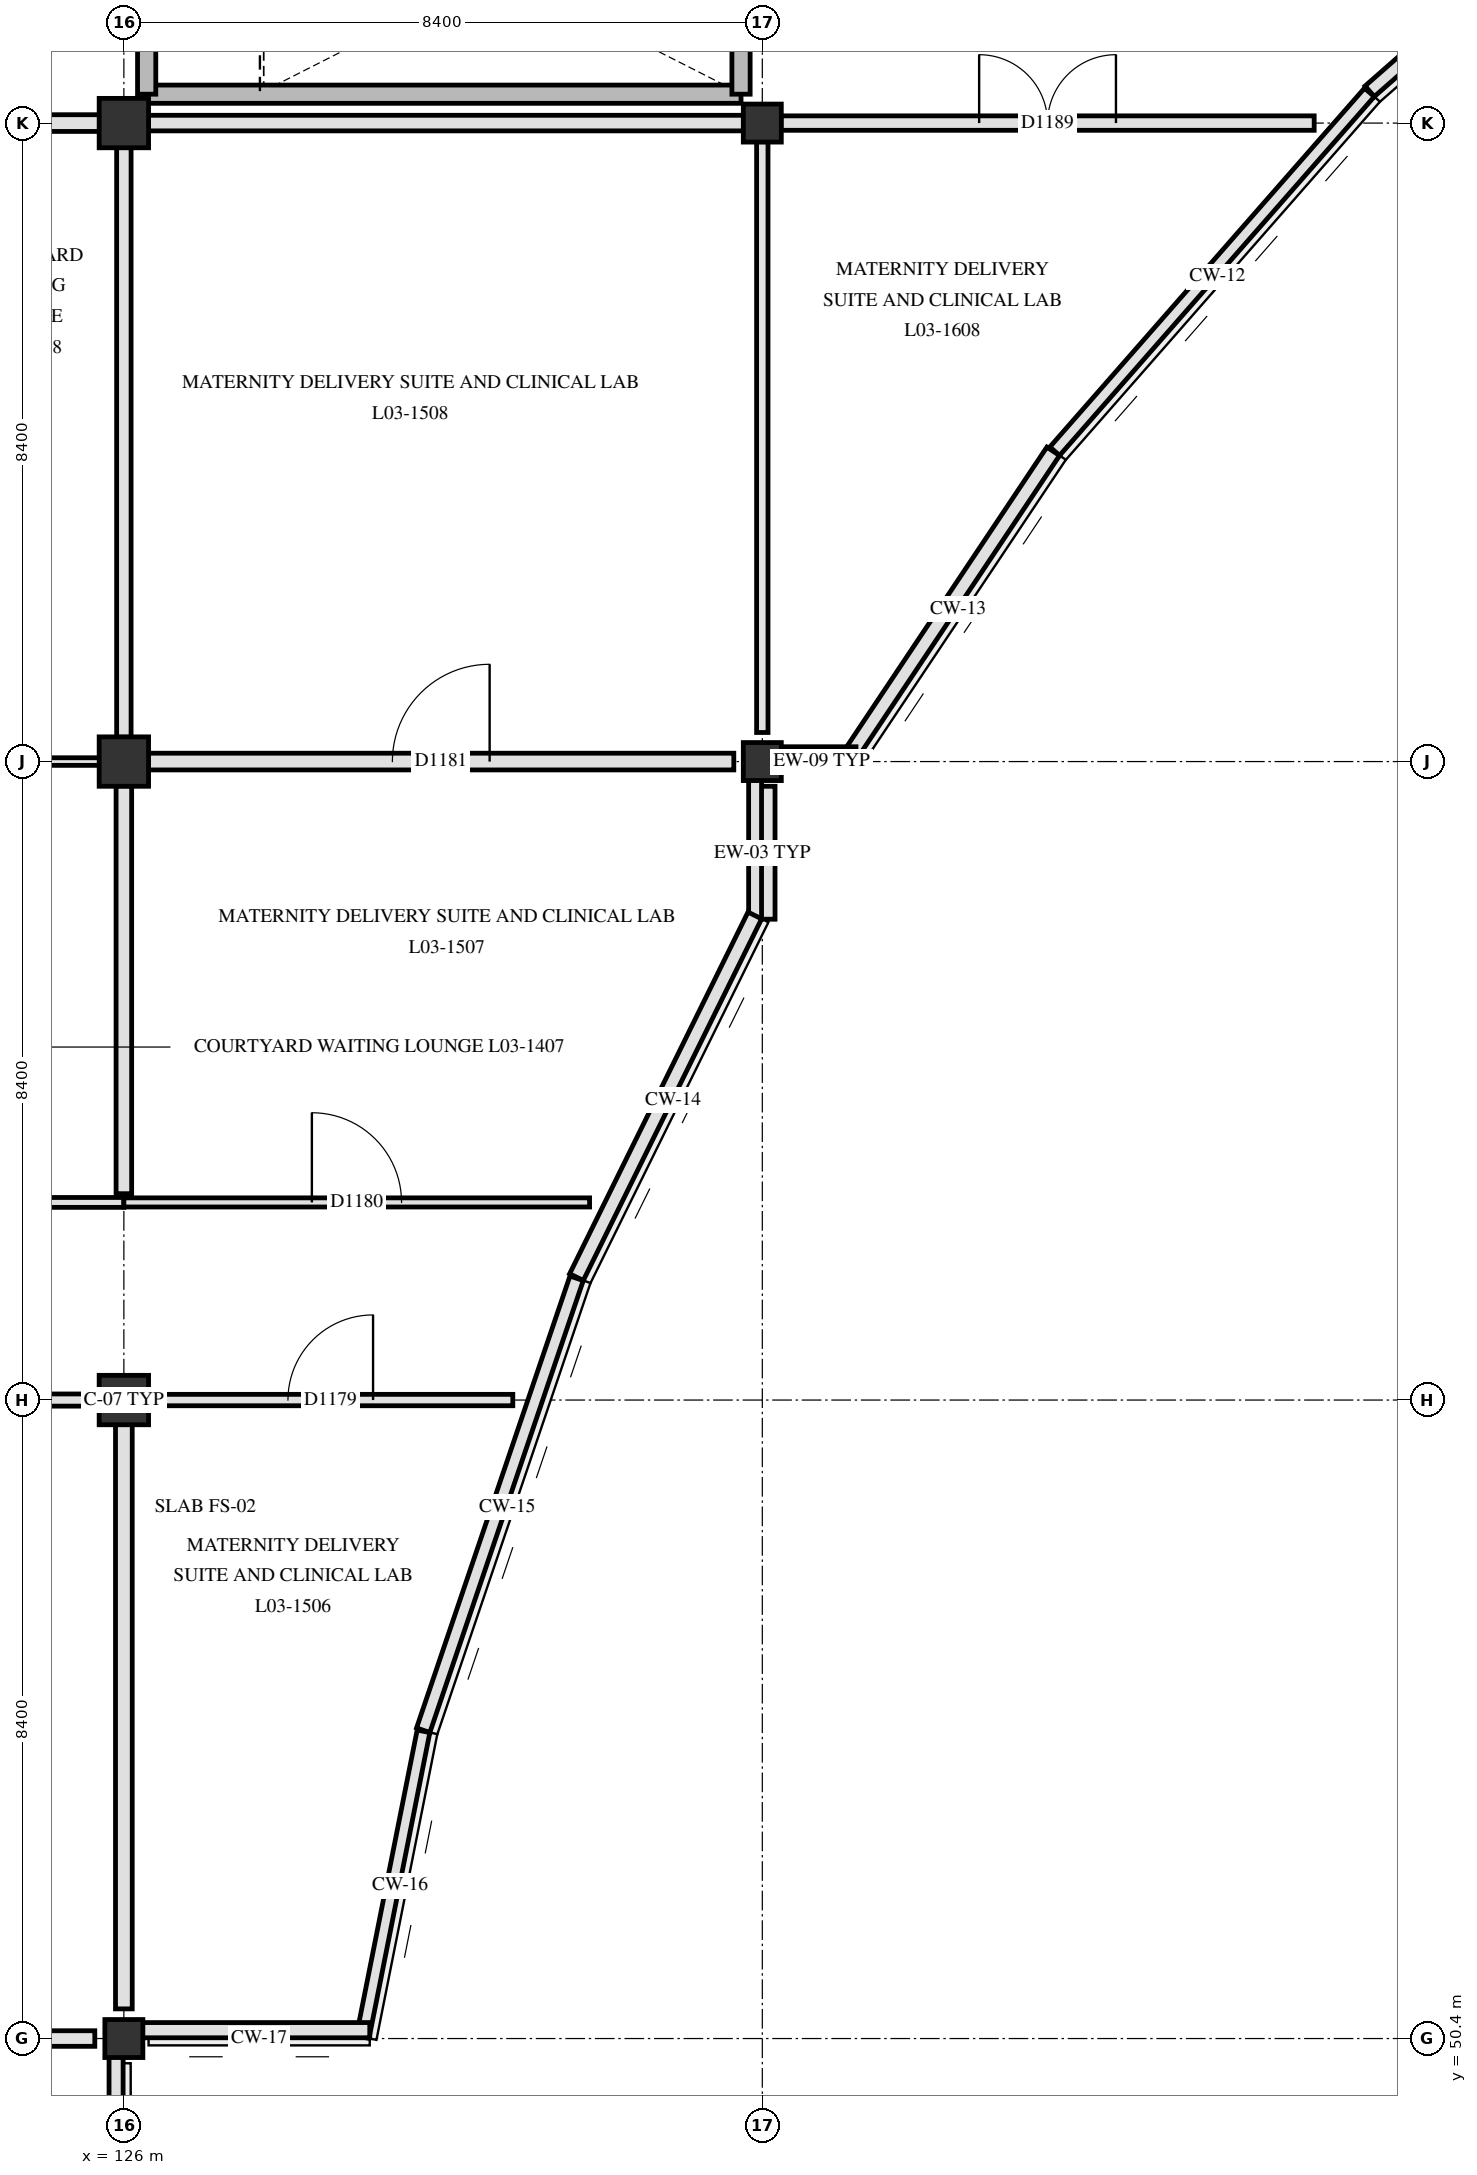
"""IFC4 building model, lengths in metres.
Left out: names, types, materials, properties, quantities, classifications, styles, units other than length and angle.
Written with IfcOpenShell. Run it as: python <this file> out.ifc"""

import sys

from ifc_helpers import new_model, si_unit, direction, frame, frame_2d, origin, origin_2d, place, context, subcontext, project, spatial, rectangle, circle, extrude, element, fill, save


model = new_model("IFC4")
c1 = context("Model", 3, precision=1e-05, world=origin(), true_north=direction((0.0, 1.0)))
c2 = subcontext(c1, "Body", "Model", "MODEL_VIEW")
j1 = project(units=[si_unit("LENGTHUNIT", "METRE"), si_unit("PLANEANGLEUNIT", "RADIAN")], contexts=[c1])
p1 = place(None, origin())
s1 = spatial("IfcSite", under=j1, at=p1, CompositionType="ELEMENT")
p2 = place(p1, origin())
s2 = spatial("IfcBuilding", under=s1, at=p2, CompositionType="ELEMENT")
p3 = place(p2, frame((0.0, 0.0, 14.4)))
s3 = spatial("IfcBuildingStorey", under=s2, at=p3, CompositionType="ELEMENT", Elevation=14.4)
p4 = place(p3, frame((126.0, 50.4, 0.0), z_axis=(0.0, 0.0, 1.0), x_axis=(1.0, 0.0, 0.0)))
e1 = element("IfcColumn", 1, at=p4, inside=s3, PredefinedType="COLUMN", context=c2, shape_type="SweptSolid", body=[
    extrude(rectangle(XDim=0.5, YDim=0.5, at=origin_2d()), origin(), (0.0, 0.0, 1.0), 4.2),
])
for number, where, z_axis, x_axis in (
    (2, (126.0, 58.8, 0.0), (0.0, 0.0, 1.0), (1.0, 0.0, 0.0)),
    (3, (126.0, 67.2, 0.0), (0.0, 0.0, 1.0), (1.0, 0.0, 0.0)),
    (4, (126.0, 75.6, 0.0), (0.0, 0.0, 1.0), (1.0, 0.0, 0.0)),
):
    element("IfcColumn", number, at=place(p3, frame(where, z_axis=z_axis, x_axis=x_axis)), inside=s3, PredefinedType="COLUMN", context=c2, shape_type="SweptSolid", body=[
        extrude(circle(Radius=0.325, at=origin_2d()), origin(), (0.0, 0.0, 1.0), 4.2),
    ])
for number, where, z_axis, x_axis in (
    (5, (134.4, 67.2, 0.0), (0.0, 0.0, 1.0), (1.0, 0.0, 0.0)),
    (6, (134.4, 75.6, 0.0), (0.0, 0.0, 1.0), (1.0, 0.0, 0.0)),
):
    element("IfcColumn", number, at=place(p3, frame(where, z_axis=z_axis, x_axis=x_axis)), inside=s3, PredefinedType="COLUMN", context=c2, shape_type="SweptSolid", body=[
        extrude(rectangle(XDim=0.5, YDim=0.5, at=origin_2d()), origin(), (0.0, 0.0, 1.0), 4.2),
    ])
p5 = place(p3, frame((135.633, 67.2, 0.0), z_axis=(0.0, 0.0, 1.0), x_axis=(-1.0, 0.0, 0.0)))
e7 = element("IfcWall", 7, at=p5, inside=s3, PredefinedType="SOLIDWALL", context=c2, shape_type="SweptSolid", body=[
    extrude(rectangle(XDim=0.908, YDim=0.235, at=frame_2d((0.454, 0.0))), origin(), (0.0, 0.0, 1.0), 3.89),
])
p6 = place(p3, frame((134.4, 66.875, 0.0), z_axis=(0.0, 0.0, 1.0), x_axis=(0.0, -1.0, 0.0)))
e8 = element("IfcWall", 8, at=p6, inside=s3, PredefinedType="SOLIDWALL", context=c2, shape_type="SweptSolid", body=[
    extrude(rectangle(XDim=1.749, YDim=0.335, at=frame_2d((0.875, 0.0))), origin(), (0.0, 0.0, 1.0), 3.89),
])
p7 = place(p3, frame((147.112, 80.158, 4.18), z_axis=(0.0, 0.0, 1.0), x_axis=(-0.751827083616, -0.659360323603, 0.0)))
e9 = element("IfcWall", 9, at=p7, inside=s3, PredefinedType="PARAPET", context=c2, shape_type="SweptSolid", body=[
    extrude(rectangle(XDim=6.279, YDim=0.185, at=frame_2d((3.139, 0.0))), origin(), (0.0, 0.0, 1.0), 1.17),
])
p8 = place(p3, frame((142.387, 76.004, 4.18), z_axis=(0.0, 0.0, 1.0), x_axis=(-0.659360323603, -0.751827083616, 0.0)))
e10 = element("IfcWall", 10, at=p8, inside=s3, PredefinedType="PARAPET", context=c2, shape_type="SweptSolid", body=[
    extrude(rectangle(XDim=6.279, YDim=0.17, at=frame_2d((3.139, 0.0))), origin(), (0.0, 0.0, 1.0), 1.17),
])
p9 = place(p3, frame((138.228, 71.281, 4.18), z_axis=(0.0, 0.0, 1.0), x_axis=(-0.555585388542, -0.831459485506, 0.0)))
e11 = element("IfcWall", 11, at=p9, inside=s3, PredefinedType="PARAPET", context=c2, shape_type="SweptSolid", body=[
    extrude(rectangle(XDim=4.835, YDim=0.2, at=frame_2d((2.418, 0.0))), origin(), (0.0, 0.0, 1.0), 1.17),
])
p10 = place(p3, frame((135.633, 67.302, 4.18), z_axis=(0.0, 0.0, 1.0), x_axis=(-1.0, 0.0, 0.0)))
e12 = element("IfcWall", 12, at=p10, inside=s3, PredefinedType="PARAPET", context=c2, shape_type="SweptSolid", body=[
    extrude(rectangle(XDim=1.233, YDim=0.185, at=frame_2d((0.616, 0.0))), origin(), (0.0, 0.0, 1.0), 1.17),
])
p11 = place(p3, frame((134.305, 67.2, 4.18), z_axis=(0.0, 0.0, 1.0), x_axis=(0.0, -1.0, 0.0)))
e13 = element("IfcWall", 13, at=p11, inside=s3, PredefinedType="PARAPET", context=c2, shape_type="SweptSolid", body=[
    extrude(rectangle(XDim=2.073, YDim=0.17, at=frame_2d((1.037, 0.0))), origin(), (0.0, 0.0, 1.0), 1.17),
])
p12 = place(p3, frame((134.301, 65.175, 4.18), z_axis=(0.0, 0.0, 1.0), x_axis=(-0.442291469854, -0.896871370763, 0.0)))
e14 = element("IfcWall", 14, at=p12, inside=s3, PredefinedType="PARAPET", context=c2, shape_type="SweptSolid", body=[
    extrude(rectangle(XDim=5.305, YDim=0.2, at=frame_2d((2.652, 0.0))), origin(), (0.0, 0.0, 1.0), 1.17),
])
p13 = place(p3, frame((131.957, 60.402, 4.18), z_axis=(0.0, 0.0, 1.0), x_axis=(-0.321460730255, -0.94692291075, 0.0)))
e15 = element("IfcWall", 15, at=p13, inside=s3, PredefinedType="PARAPET", context=c2, shape_type="SweptSolid", body=[
    extrude(rectangle(XDim=6.279, YDim=0.185, at=frame_2d((3.139, 0.0))), origin(), (0.0, 0.0, 1.0), 1.17),
])
p14 = place(p3, frame((129.942, 54.442, 4.18), z_axis=(0.0, 0.0, 1.0), x_axis=(-0.195085981744, -0.980786143727, 0.0)))
e16 = element("IfcWall", 16, at=p14, inside=s3, PredefinedType="PARAPET", context=c2, shape_type="SweptSolid", body=[
    extrude(rectangle(XDim=4.102, YDim=0.17, at=frame_2d((2.051, 0.0))), origin(), (0.0, 0.0, 1.0), 1.17),
])
p15 = place(p3, frame((129.235, 50.51, 4.18), z_axis=(0.0, 0.0, 1.0), x_axis=(-1.0, 0.0, 0.0)))
e17 = element("IfcWall", 17, at=p15, inside=s3, PredefinedType="PARAPET", context=c2, shape_type="SweptSolid", body=[
    extrude(rectangle(XDim=3.235, YDim=0.2, at=frame_2d((1.618, 0.0))), origin(), (0.0, 0.0, 1.0), 1.17),
])
p16 = place(p3, frame((125.897, 50.4, 4.18), z_axis=(0.0, 0.0, 1.0), x_axis=(0.0, -1.0, 0.0)))
e18 = element("IfcWall", 18, at=p16, inside=s3, PredefinedType="PARAPET", context=c2, shape_type="SweptSolid", body=[
    extrude(rectangle(XDim=8.4, YDim=0.185, at=frame_2d((4.2, 0.0))), origin(), (0.0, 0.0, 1.0), 1.17),
])
p17 = place(p3, frame((126.3, 75.98, 0.0), z_axis=(0.0, 0.0, 1.0), x_axis=(1.0, 0.0, 0.0)))
e19 = element("IfcWall", 19, at=p17, inside=s3, PredefinedType="SHEAR", context=c2, shape_type="SweptSolid", body=[
    extrude(rectangle(XDim=7.82, YDim=0.24, at=frame_2d((3.91, 0.0))), origin(), (0.0, 0.0, 1.0), 3.9),
])
for number, where, z_axis, x_axis in (
    (20, (126.3, 75.98, 0.0), (0.0, 0.0, 1.0), (0.0, 1.0, 0.0)),
    (21, (134.12, 75.98, 0.0), (0.0, 0.0, 1.0), (0.0, 1.0, 0.0)),
):
    element("IfcWall", number, at=place(p3, frame(where, z_axis=z_axis, x_axis=x_axis)), inside=s3, PredefinedType="SHEAR", context=c2, shape_type="SweptSolid", body=[
        extrude(rectangle(XDim=3.32, YDim=0.24, at=frame_2d((1.66, 0.0))), origin(), (0.0, 0.0, 1.0), 3.9),
    ])
p18 = place(p3, frame((117.945, 50.4, 0.0), z_axis=(0.0, 0.0, 1.0), x_axis=(1.0, 0.0, 0.0)))
e22 = element("IfcWall", 22, at=p18, inside=s3, PredefinedType="PARTITIONING", context=c2, shape_type="SweptSolid", body=[
    extrude(rectangle(XDim=7.672, YDim=0.205, at=frame_2d((3.836, 0.0))), origin(), (0.0, 0.0, 1.0), 3.29),
])
p19 = place(p3, frame((117.92, 58.8, 0.0), z_axis=(0.0, 0.0, 1.0), x_axis=(1.0, 0.0, 0.0)))
e23 = element("IfcWall", 23, at=p19, inside=s3, PredefinedType="PARTITIONING", context=c2, shape_type="SweptSolid", body=[
    extrude(rectangle(XDim=7.76, YDim=0.16, at=frame_2d((3.88, 0.0))), origin(), (0.0, 0.0, 1.0), 3.29),
])
p20 = place(p19, frame((3.23, 0.0, 0.0)))
e24 = element("IfcOpeningElement", 24, at=p20, cuts=e23, PredefinedType="OPENING", context=c2, shape_type="SweptSolid", body=[
    extrude(rectangle(XDim=1.3, YDim=2.2, at=frame_2d((0.65, 1.1))), frame((0.0, 0.09, 0.0), z_axis=(0.0, -1.0, 0.0), x_axis=(1.0, 0.0, 0.0)), (0.0, 0.0, 1.0), 0.18),
])
p21 = place(p3, frame((126.32, 58.8, 0.0), z_axis=(0.0, 0.0, 1.0), x_axis=(1.0, 0.0, 0.0)))
e25 = element("IfcWall", 25, at=p21, inside=s3, PredefinedType="PARTITIONING", context=c2, shape_type="SweptSolid", body=[
    extrude(rectangle(XDim=4.797, YDim=0.15, at=frame_2d((2.398, 0.0))), origin(), (0.0, 0.0, 1.0), 3.89),
])
p22 = place(p21, frame((1.839, 0.0, 0.0)))
e26 = element("IfcOpeningElement", 26, at=p22, cuts=e25, PredefinedType="OPENING", context=c2, shape_type="SweptSolid", body=[
    extrude(rectangle(XDim=1.12, YDim=2.18, at=frame_2d((0.56, 1.09))), frame((0.0, 0.085, 0.0), z_axis=(0.0, -1.0, 0.0), x_axis=(1.0, 0.0, 0.0)), (0.0, 0.0, 1.0), 0.17),
])
p23 = place(p3, frame((122.087, 61.4, 0.0), z_axis=(0.0, 0.0, 1.0), x_axis=(1.0, 0.0, 0.0)))
e27 = element("IfcWall", 27, at=p23, inside=s3, PredefinedType="PARTITIONING", context=c2, shape_type="SweptSolid", body=[
    extrude(rectangle(XDim=3.913, YDim=0.13, at=frame_2d((1.957, 0.0))), origin(), (0.0, 0.0, 1.0), 2.69),
])
p24 = place(p23, frame((1.216, 0.0, 0.0)))
e28 = element("IfcOpeningElement", 28, at=p24, cuts=e27, PredefinedType="OPENING", context=c2, shape_type="SweptSolid", body=[
    extrude(rectangle(XDim=1.48, YDim=2.22, at=frame_2d((0.74, 1.11))), frame((0.0, 0.075, 0.0), z_axis=(0.0, -1.0, 0.0), x_axis=(1.0, 0.0, 0.0)), (0.0, 0.0, 1.0), 0.15),
])
p25 = place(p3, frame((126.0, 61.4, 0.0), z_axis=(0.0, 0.0, 1.0), x_axis=(1.0, 0.0, 0.0)))
e29 = element("IfcWall", 29, at=p25, inside=s3, PredefinedType="PARTITIONING", context=c2, shape_type="SweptSolid", body=[
    extrude(rectangle(XDim=6.127, YDim=0.12, at=frame_2d((3.064, 0.0))), origin(), (0.0, 0.0, 1.0), 2.69),
])
p26 = place(p25, frame((2.474, 0.0, 0.0)))
e30 = element("IfcOpeningElement", 30, at=p26, cuts=e29, PredefinedType="OPENING", context=c2, shape_type="SweptSolid", body=[
    extrude(rectangle(XDim=1.18, YDim=2.18, at=frame_2d((0.59, 1.09))), frame((0.0, 0.07, 0.0), z_axis=(0.0, -1.0, 0.0), x_axis=(1.0, 0.0, 0.0)), (0.0, 0.0, 1.0), 0.14),
])
p27 = place(p3, frame((124.551, 67.2, 0.0), z_axis=(0.0, 0.0, 1.0), x_axis=(1.0, 0.0, 0.0)))
e31 = element("IfcWall", 31, at=p27, inside=s3, PredefinedType="PARTITIONING", context=c2, shape_type="SweptSolid", body=[
    extrude(rectangle(XDim=1.129, YDim=0.1, at=frame_2d((0.564, 0.0))), origin(), (0.0, 0.0, 1.0), 3.89),
])
p28 = place(p3, frame((126.32, 67.2, 0.0), z_axis=(0.0, 0.0, 1.0), x_axis=(1.0, 0.0, 0.0)))
e32 = element("IfcWall", 32, at=p28, inside=s3, PredefinedType="PARTITIONING", context=c2, shape_type="SweptSolid", body=[
    extrude(rectangle(XDim=7.705, YDim=0.22, at=frame_2d((3.853, 0.0))), origin(), (0.0, 0.0, 1.0), 3.29),
])
p29 = place(p28, frame((3.212, 0.0, 0.0)))
e33 = element("IfcOpeningElement", 33, at=p29, cuts=e32, PredefinedType="OPENING", context=c2, shape_type="SweptSolid", body=[
    extrude(rectangle(XDim=1.28, YDim=2.18, at=frame_2d((0.64, 1.09))), frame((0.0, 0.12, 0.0), z_axis=(0.0, -1.0, 0.0), x_axis=(1.0, 0.0, 0.0)), (0.0, 0.0, 1.0), 0.24),
])
p30 = place(p3, frame((117.92, 75.6, 0.0), z_axis=(0.0, 0.0, 1.0), x_axis=(1.0, 0.0, 0.0)))
e34 = element("IfcWall", 34, at=p30, inside=s3, PredefinedType="PARTITIONING", context=c2, shape_type="SweptSolid", body=[
    extrude(rectangle(XDim=7.76, YDim=0.22, at=frame_2d((3.88, 0.0))), origin(), (0.0, 0.0, 1.0), 3.29),
])
p31 = place(p30, frame((3.11, 0.0, 0.0)))
e35 = element("IfcOpeningElement", 35, at=p31, cuts=e34, PredefinedType="OPENING", context=c2, shape_type="SweptSolid", body=[
    extrude(rectangle(XDim=1.54, YDim=2.24, at=frame_2d((0.77, 1.12))), frame((0.0, 0.12, 0.0), z_axis=(0.0, -1.0, 0.0), x_axis=(1.0, 0.0, 0.0)), (0.0, 0.0, 1.0), 0.24),
])
p32 = place(p3, frame((126.32, 75.6, 0.0), z_axis=(0.0, 0.0, 1.0), x_axis=(1.0, 0.0, 0.0)))
e36 = element("IfcWall", 36, at=p32, inside=s3, PredefinedType="PARTITIONING", context=c2, shape_type="SweptSolid", body=[
    extrude(rectangle(XDim=7.835, YDim=0.205, at=frame_2d((3.917, 0.0))), origin(), (0.0, 0.0, 1.0), 3.29),
])
p33 = place(p3, frame((134.645, 75.6, 0.0), z_axis=(0.0, 0.0, 1.0), x_axis=(1.0, 0.0, 0.0)))
e37 = element("IfcWall", 37, at=p33, inside=s3, PredefinedType="PARTITIONING", context=c2, shape_type="SweptSolid", body=[
    extrude(rectangle(XDim=7.016, YDim=0.19, at=frame_2d((3.508, 0.0))), origin(), (0.0, 0.0, 1.0), 3.89),
])
p34 = place(p33, frame((2.608, 0.0, 0.0)))
e38 = element("IfcOpeningElement", 38, at=p34, cuts=e37, PredefinedType="OPENING", context=c2, shape_type="SweptSolid", body=[
    extrude(rectangle(XDim=1.8, YDim=2.25, at=frame_2d((0.9, 1.125))), frame((0.0, 0.105, 0.0), z_axis=(0.0, -1.0, 0.0), x_axis=(1.0, 0.0, 0.0)), (0.0, 0.0, 1.0), 0.21),
])
p35 = place(p3, frame((126.0, 50.79, 0.0), z_axis=(0.0, 0.0, 1.0), x_axis=(0.0, 1.0, 0.0)))
e39 = element("IfcWall", 39, at=p35, inside=s3, PredefinedType="PARTITIONING", context=c2, shape_type="SweptSolid", body=[
    extrude(rectangle(XDim=7.69, YDim=0.22, at=frame_2d((3.845, 0.0))), origin(), (0.0, 0.0, 1.0), 2.69),
])
p36 = place(p3, frame((126.0, 61.515, 0.0), z_axis=(0.0, 0.0, 1.0), x_axis=(0.0, 1.0, 0.0)))
e40 = element("IfcWall", 40, at=p36, inside=s3, PredefinedType="PARTITIONING", context=c2, shape_type="SweptSolid", body=[
    extrude(rectangle(XDim=5.365, YDim=0.205, at=frame_2d((2.683, 0.0))), origin(), (0.0, 0.0, 1.0), 2.69),
])
p37 = place(p3, frame((126.0, 67.52, 0.0), z_axis=(0.0, 0.0, 1.0), x_axis=(0.0, 1.0, 0.0)))
e41 = element("IfcWall", 41, at=p37, inside=s3, PredefinedType="PARTITIONING", context=c2, shape_type="SweptSolid", body=[
    extrude(rectangle(XDim=7.76, YDim=0.19, at=frame_2d((3.88, 0.0))), origin(), (0.0, 0.0, 1.0), 2.69),
])
p38 = place(p3, frame((134.4, 67.583, 0.0), z_axis=(0.0, 0.0, 1.0), x_axis=(0.0, 1.0, 0.0)))
e42 = element("IfcWall", 42, at=p38, inside=s3, PredefinedType="PARTITIONING", context=c2, shape_type="SweptSolid", body=[
    extrude(rectangle(XDim=7.772, YDim=0.15, at=frame_2d((3.886, 0.0))), origin(), (0.0, 0.0, 1.0), 3.34),
])
p39 = place(p22, origin())
e43 = element("IfcDoor", 43, at=p39, inside=s3, OperationType="SINGLE_SWING_RIGHT", PredefinedType="DOOR", context=c2, shape_type="SweptSolid", body=[
    extrude(rectangle(XDim=1.12, YDim=2.18, at=frame_2d((0.56, 1.09))), frame((0.0, 0.025, 0.0), z_axis=(0.0, -1.0, 0.0), x_axis=(1.0, 0.0, 0.0)), (0.0, 0.0, 1.0), 0.05),
])
fill(e26, e43)
p40 = place(p26, origin())
e44 = element("IfcDoor", 44, at=p40, inside=s3, OperationType="SINGLE_SWING_LEFT", PredefinedType="DOOR", context=c2, shape_type="SweptSolid", body=[
    extrude(rectangle(XDim=1.18, YDim=2.18, at=frame_2d((0.59, 1.09))), frame((0.0, 0.025, 0.0), z_axis=(0.0, -1.0, 0.0), x_axis=(1.0, 0.0, 0.0)), (0.0, 0.0, 1.0), 0.05),
])
fill(e30, e44)
p41 = place(p29, origin())
e45 = element("IfcDoor", 45, at=p41, inside=s3, OperationType="SINGLE_SWING_RIGHT", PredefinedType="DOOR", context=c2, shape_type="SweptSolid", body=[
    extrude(rectangle(XDim=1.28, YDim=2.18, at=frame_2d((0.64, 1.09))), frame((0.0, 0.025, 0.0), z_axis=(0.0, -1.0, 0.0), x_axis=(1.0, 0.0, 0.0)), (0.0, 0.0, 1.0), 0.05),
])
fill(e33, e45)
p42 = place(p34, origin())
e46 = element("IfcDoor", 46, at=p42, inside=s3, OperationType="DOUBLE_SWING_RIGHT", PredefinedType="DOOR", context=c2, shape_type="SweptSolid", body=[
    extrude(rectangle(XDim=1.8, YDim=2.25, at=frame_2d((0.9, 1.125))), frame((0.0, 0.025, 0.0), z_axis=(0.0, -1.0, 0.0), x_axis=(1.0, 0.0, 0.0)), (0.0, 0.0, 1.0), 0.05),
])
fill(e38, e46)
save(model, sys.argv[1])
